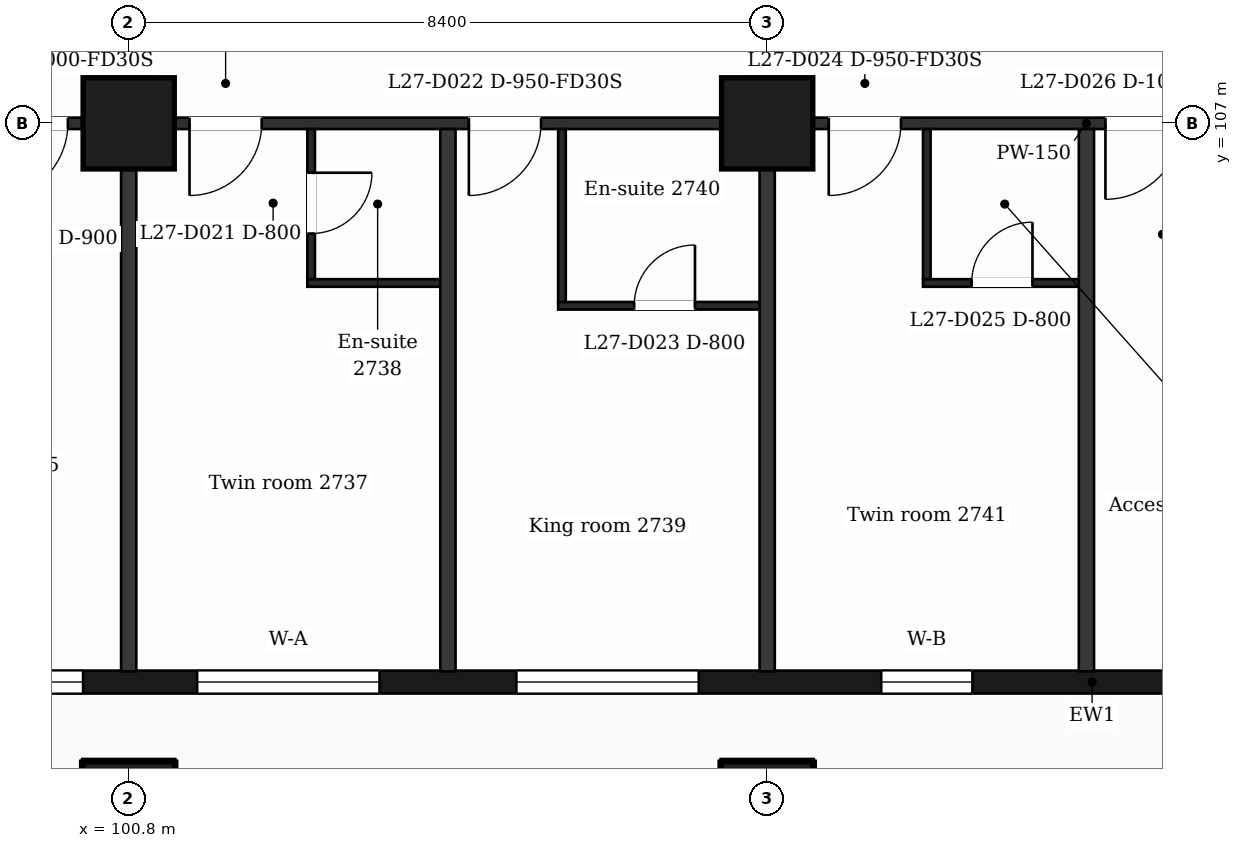
"""IFC4 building model, lengths in metres.
Left out: names, types, materials, properties, quantities, classifications, styles, units other than length and angle.
Written with IfcOpenShell. Run it as: python <this file> out.ifc"""

import sys

from ifc_helpers import new_model, si_unit, direction, frame, frame_2d, origin, origin_2d, place, context, subcontext, project, spatial, rectangle, extrude, element, fill, save


model = new_model("IFC4")
c1 = context("Model", 3, precision=1e-05, world=origin(), true_north=direction((0.0, 1.0)))
c2 = subcontext(c1, "Body", "Model", "MODEL_VIEW")
j1 = project(units=[si_unit("LENGTHUNIT", "METRE"), si_unit("PLANEANGLEUNIT", "RADIAN")], contexts=[c1])
p1 = place(None, origin())
s1 = spatial("IfcSite", under=j1, at=p1, CompositionType="ELEMENT")
p2 = place(p1, origin())
s2 = spatial("IfcBuilding", under=s1, at=p2, CompositionType="ELEMENT")
p3 = place(p2, frame((0.0, 0.0, 116.9)))
s3 = spatial("IfcBuildingStorey", under=s2, at=p3, CompositionType="ELEMENT", Elevation=116.9)
for number, where, z_axis, x_axis in (
    (1, (100.8, 98.0, 0.0), (0.0, 0.0, 1.0), (1.0, 0.0, 0.0)),
    (2, (109.2, 98.0, 0.0), (0.0, 0.0, 1.0), (1.0, 0.0, 0.0)),
    (3, (100.8, 107.0, 0.0), (0.0, 0.0, 1.0), (1.0, 0.0, 0.0)),
    (4, (109.2, 107.0, 0.0), (0.0, 0.0, 1.0), (1.0, 0.0, 0.0)),
):
    element("IfcColumn", number, at=place(p3, frame(where, z_axis=z_axis, x_axis=x_axis)), inside=s3, PredefinedType="COLUMN", context=c2, shape_type="SweptSolid", body=[
        extrude(rectangle(XDim=1.2, YDim=1.2, at=origin_2d()), origin(), (0.0, 0.0, 1.0), 3.7),
    ])
p4 = place(p3, frame((89.85, 99.65, 0.0), z_axis=(0.0, 0.0, 1.0), x_axis=(1.0, 0.0, 0.0)))
e5 = element("IfcWall", 5, at=p4, inside=s3, PredefinedType="SOLIDWALL", context=c2, shape_type="SweptSolid", body=[
    extrude(rectangle(XDim=47.25, YDim=0.3, at=frame_2d((23.625, 0.0))), origin(), (0.0, 0.0, 1.0), 3.38),
])
p5 = place(p4, frame((0.725, 0.0, 0.9)))
e6 = element("IfcOpeningElement", 6, at=p5, cuts=e5, PredefinedType="OPENING", context=c2, shape_type="SweptSolid", body=[
    extrude(rectangle(XDim=1.2, YDim=2.1, at=frame_2d((0.6, 1.05))), frame((0.0, 0.16, 0.0), z_axis=(0.0, -1.0, 0.0), x_axis=(1.0, 0.0, 0.0)), (0.0, 0.0, 1.0), 0.32),
])
p6 = place(p4, frame((3.45, 0.0, 0.9)))
e7 = element("IfcOpeningElement", 7, at=p6, cuts=e5, PredefinedType="OPENING", context=c2, shape_type="SweptSolid", body=[
    extrude(rectangle(XDim=2.4, YDim=2.1, at=frame_2d((1.2, 1.05))), frame((0.0, 0.16, 0.0), z_axis=(0.0, -1.0, 0.0), x_axis=(1.0, 0.0, 0.0)), (0.0, 0.0, 1.0), 0.32),
])
p7 = place(p4, frame((7.35, 0.0, 0.0)))
e8 = element("IfcOpeningElement", 8, at=p7, cuts=e5, PredefinedType="OPENING", context=c2, shape_type="SweptSolid", body=[
    extrude(rectangle(XDim=1.2, YDim=2.4, at=frame_2d((0.6, 1.2))), frame((0.0, 0.16, 0.0), z_axis=(0.0, -1.0, 0.0), x_axis=(1.0, 0.0, 0.0)), (0.0, 0.0, 1.0), 0.32),
])
p8 = place(p4, frame((9.15, 0.0, 0.9)))
e9 = element("IfcOpeningElement", 9, at=p8, cuts=e5, PredefinedType="OPENING", context=c2, shape_type="SweptSolid", body=[
    extrude(rectangle(XDim=1.2, YDim=2.1, at=frame_2d((0.6, 1.05))), frame((0.0, 0.16, 0.0), z_axis=(0.0, -1.0, 0.0), x_axis=(1.0, 0.0, 0.0)), (0.0, 0.0, 1.0), 0.32),
])
p9 = place(p4, frame((11.85, 0.0, 0.9)))
e10 = element("IfcOpeningElement", 10, at=p9, cuts=e5, PredefinedType="OPENING", context=c2, shape_type="SweptSolid", body=[
    extrude(rectangle(XDim=2.4, YDim=2.1, at=frame_2d((1.2, 1.05))), frame((0.0, 0.16, 0.0), z_axis=(0.0, -1.0, 0.0), x_axis=(1.0, 0.0, 0.0)), (0.0, 0.0, 1.0), 0.32),
])
p10 = place(p4, frame((16.05, 0.0, 0.9)))
e11 = element("IfcOpeningElement", 11, at=p10, cuts=e5, PredefinedType="OPENING", context=c2, shape_type="SweptSolid", body=[
    extrude(rectangle(XDim=2.4, YDim=2.1, at=frame_2d((1.2, 1.05))), frame((0.0, 0.16, 0.0), z_axis=(0.0, -1.0, 0.0), x_axis=(1.0, 0.0, 0.0)), (0.0, 0.0, 1.0), 0.32),
])
p11 = place(p4, frame((20.85, 0.0, 0.9)))
e12 = element("IfcOpeningElement", 12, at=p11, cuts=e5, PredefinedType="OPENING", context=c2, shape_type="SweptSolid", body=[
    extrude(rectangle(XDim=1.2, YDim=2.1, at=frame_2d((0.6, 1.05))), frame((0.0, 0.16, 0.0), z_axis=(0.0, -1.0, 0.0), x_axis=(1.0, 0.0, 0.0)), (0.0, 0.0, 1.0), 0.32),
])
p12 = place(p4, frame((25.05, 0.0, 0.9)))
e13 = element("IfcOpeningElement", 13, at=p12, cuts=e5, PredefinedType="OPENING", context=c2, shape_type="SweptSolid", body=[
    extrude(rectangle(XDim=1.2, YDim=2.1, at=frame_2d((0.6, 1.05))), frame((0.0, 0.16, 0.0), z_axis=(0.0, -1.0, 0.0), x_axis=(1.0, 0.0, 0.0)), (0.0, 0.0, 1.0), 0.32),
])
p13 = place(p4, frame((28.65, 0.0, 0.9)))
e14 = element("IfcOpeningElement", 14, at=p13, cuts=e5, PredefinedType="OPENING", context=c2, shape_type="SweptSolid", body=[
    extrude(rectangle(XDim=2.4, YDim=2.1, at=frame_2d((1.2, 1.05))), frame((0.0, 0.16, 0.0), z_axis=(0.0, -1.0, 0.0), x_axis=(1.0, 0.0, 0.0)), (0.0, 0.0, 1.0), 0.32),
])
p14 = place(p4, frame((32.85, 0.0, 0.9)))
e15 = element("IfcOpeningElement", 15, at=p14, cuts=e5, PredefinedType="OPENING", context=c2, shape_type="SweptSolid", body=[
    extrude(rectangle(XDim=2.4, YDim=2.1, at=frame_2d((1.2, 1.05))), frame((0.0, 0.16, 0.0), z_axis=(0.0, -1.0, 0.0), x_axis=(1.0, 0.0, 0.0)), (0.0, 0.0, 1.0), 0.32),
])
p15 = place(p4, frame((37.05, 0.0, 0.9)))
e16 = element("IfcOpeningElement", 16, at=p15, cuts=e5, PredefinedType="OPENING", context=c2, shape_type="SweptSolid", body=[
    extrude(rectangle(XDim=2.4, YDim=2.1, at=frame_2d((1.2, 1.05))), frame((0.0, 0.16, 0.0), z_axis=(0.0, -1.0, 0.0), x_axis=(1.0, 0.0, 0.0)), (0.0, 0.0, 1.0), 0.32),
])
p16 = place(p4, frame((41.25, 0.0, 0.9)))
e17 = element("IfcOpeningElement", 17, at=p16, cuts=e5, PredefinedType="OPENING", context=c2, shape_type="SweptSolid", body=[
    extrude(rectangle(XDim=2.4, YDim=2.1, at=frame_2d((1.2, 1.05))), frame((0.0, 0.16, 0.0), z_axis=(0.0, -1.0, 0.0), x_axis=(1.0, 0.0, 0.0)), (0.0, 0.0, 1.0), 0.32),
])
p17 = place(p4, frame((45.25, 0.0, 0.9)))
e18 = element("IfcOpeningElement", 18, at=p17, cuts=e5, PredefinedType="OPENING", context=c2, shape_type="SweptSolid", body=[
    extrude(rectangle(XDim=1.2, YDim=2.1, at=frame_2d((0.6, 1.05))), frame((0.0, 0.16, 0.0), z_axis=(0.0, -1.0, 0.0), x_axis=(1.0, 0.0, 0.0)), (0.0, 0.0, 1.0), 0.32),
])
p18 = place(p3, frame((106.45, 104.6, 0.0), z_axis=(0.0, 0.0, 1.0), x_axis=(1.0, 0.0, 0.0)))
e19 = element("IfcWall", 19, at=p18, inside=s3, PredefinedType="PARTITIONING", context=c2, shape_type="SweptSolid", body=[
    extrude(rectangle(XDim=2.75, YDim=0.1, at=frame_2d((1.375, 0.0))), origin(), (0.0, 0.0, 1.0), 3.38),
])
p19 = place(p18, frame((1.0, 0.0, 0.0)))
e20 = element("IfcOpeningElement", 20, at=p19, cuts=e19, PredefinedType="OPENING", context=c2, shape_type="SweptSolid", body=[
    extrude(rectangle(XDim=0.8, YDim=2.1, at=frame_2d((0.4, 1.05))), frame((0.0, 0.06, 0.0), z_axis=(0.0, -1.0, 0.0), x_axis=(1.0, 0.0, 0.0)), (0.0, 0.0, 1.0), 0.12),
])
p20 = place(p3, frame((103.15, 104.9, 0.0), z_axis=(0.0, 0.0, 1.0), x_axis=(1.0, 0.0, 0.0)))
e21 = element("IfcWall", 21, at=p20, inside=s3, PredefinedType="PARTITIONING", context=c2, shape_type="SweptSolid", body=[
    extrude(rectangle(XDim=1.85, YDim=0.1, at=frame_2d((0.925, 0.0))), origin(), (0.0, 0.0, 1.0), 3.38),
])
p21 = place(p3, frame((111.25, 104.9, 0.0), z_axis=(0.0, 0.0, 1.0), x_axis=(1.0, 0.0, 0.0)))
e22 = element("IfcWall", 22, at=p21, inside=s3, PredefinedType="PARTITIONING", context=c2, shape_type="SweptSolid", body=[
    extrude(rectangle(XDim=2.15, YDim=0.1, at=frame_2d((1.075, 0.0))), origin(), (0.0, 0.0, 1.0), 3.38),
])
p22 = place(p21, frame((0.64, 0.0, 0.0)))
e23 = element("IfcOpeningElement", 23, at=p22, cuts=e22, PredefinedType="OPENING", context=c2, shape_type="SweptSolid", body=[
    extrude(rectangle(XDim=0.8, YDim=2.1, at=frame_2d((0.4, 1.05))), frame((0.0, 0.06, 0.0), z_axis=(0.0, -1.0, 0.0), x_axis=(1.0, 0.0, 0.0)), (0.0, 0.0, 1.0), 0.12),
])
p23 = place(p3, frame((87.018, 107.0, 0.0), z_axis=(0.0, 0.0, 1.0), x_axis=(1.0, 0.0, 0.0)))
e24 = element("IfcWall", 24, at=p23, inside=s3, PredefinedType="PARTITIONING", context=c2, shape_type="SweptSolid", body=[
    extrude(rectangle(XDim=52.765, YDim=0.15, at=frame_2d((26.382, 0.0))), origin(), (0.0, 0.0, 1.0), 3.38),
])
p24 = place(p23, frame((1.276, 0.0, 0.0)))
e25 = element("IfcOpeningElement", 25, at=p24, cuts=e24, PredefinedType="OPENING", context=c2, shape_type="SweptSolid", body=[
    extrude(rectangle(XDim=0.95, YDim=2.1, at=frame_2d((0.475, 1.05))), frame((0.0, 0.085, 0.0), z_axis=(0.0, -1.0, 0.0), x_axis=(1.0, 0.0, 0.0)), (0.0, 0.0, 1.0), 0.17),
])
p25 = place(p23, frame((6.192, 0.0, 0.0)))
e26 = element("IfcOpeningElement", 26, at=p25, cuts=e24, PredefinedType="OPENING", context=c2, shape_type="SweptSolid", body=[
    extrude(rectangle(XDim=0.95, YDim=2.1, at=frame_2d((0.475, 1.05))), frame((0.0, 0.085, 0.0), z_axis=(0.0, -1.0, 0.0), x_axis=(1.0, 0.0, 0.0)), (0.0, 0.0, 1.0), 0.17),
])
p26 = place(p23, frame((11.982, 0.0, 0.0)))
e27 = element("IfcOpeningElement", 27, at=p26, cuts=e24, PredefinedType="OPENING", context=c2, shape_type="SweptSolid", body=[
    extrude(rectangle(XDim=1.0, YDim=2.1, at=frame_2d((0.5, 1.05))), frame((0.0, 0.085, 0.0), z_axis=(0.0, -1.0, 0.0), x_axis=(1.0, 0.0, 0.0)), (0.0, 0.0, 1.0), 0.17),
])
p27 = place(p23, frame((14.582, 0.0, 0.0)))
e28 = element("IfcOpeningElement", 28, at=p27, cuts=e24, PredefinedType="OPENING", context=c2, shape_type="SweptSolid", body=[
    extrude(rectangle(XDim=0.95, YDim=2.1, at=frame_2d((0.475, 1.05))), frame((0.0, 0.085, 0.0), z_axis=(0.0, -1.0, 0.0), x_axis=(1.0, 0.0, 0.0)), (0.0, 0.0, 1.0), 0.17),
])
p28 = place(p23, frame((18.257, 0.0, 0.0)))
e29 = element("IfcOpeningElement", 29, at=p28, cuts=e24, PredefinedType="OPENING", context=c2, shape_type="SweptSolid", body=[
    extrude(rectangle(XDim=0.95, YDim=2.1, at=frame_2d((0.475, 1.05))), frame((0.0, 0.085, 0.0), z_axis=(0.0, -1.0, 0.0), x_axis=(1.0, 0.0, 0.0)), (0.0, 0.0, 1.0), 0.17),
])
p29 = place(p23, frame((22.992, 0.0, 0.0)))
e30 = element("IfcOpeningElement", 30, at=p29, cuts=e24, PredefinedType="OPENING", context=c2, shape_type="SweptSolid", body=[
    extrude(rectangle(XDim=0.95, YDim=2.1, at=frame_2d((0.475, 1.05))), frame((0.0, 0.085, 0.0), z_axis=(0.0, -1.0, 0.0), x_axis=(1.0, 0.0, 0.0)), (0.0, 0.0, 1.0), 0.17),
])
p30 = place(p23, frame((26.632, 0.0, 0.0)))
e31 = element("IfcOpeningElement", 31, at=p30, cuts=e24, PredefinedType="OPENING", context=c2, shape_type="SweptSolid", body=[
    extrude(rectangle(XDim=1.0, YDim=2.1, at=frame_2d((0.5, 1.05))), frame((0.0, 0.085, 0.0), z_axis=(0.0, -1.0, 0.0), x_axis=(1.0, 0.0, 0.0)), (0.0, 0.0, 1.0), 0.17),
])
p31 = place(p23, frame((33.557, 0.0, 0.0)))
e32 = element("IfcOpeningElement", 32, at=p31, cuts=e24, PredefinedType="OPENING", context=c2, shape_type="SweptSolid", body=[
    extrude(rectangle(XDim=0.95, YDim=2.1, at=frame_2d((0.475, 1.05))), frame((0.0, 0.085, 0.0), z_axis=(0.0, -1.0, 0.0), x_axis=(1.0, 0.0, 0.0)), (0.0, 0.0, 1.0), 0.17),
])
p32 = place(p23, frame((37.182, 0.0, 0.0)))
e33 = element("IfcOpeningElement", 33, at=p32, cuts=e24, PredefinedType="OPENING", context=c2, shape_type="SweptSolid", body=[
    extrude(rectangle(XDim=0.95, YDim=2.1, at=frame_2d((0.475, 1.05))), frame((0.0, 0.085, 0.0), z_axis=(0.0, -1.0, 0.0), x_axis=(1.0, 0.0, 0.0)), (0.0, 0.0, 1.0), 0.17),
])
p33 = place(p23, frame((41.957, 0.0, 0.0)))
e34 = element("IfcOpeningElement", 34, at=p33, cuts=e24, PredefinedType="OPENING", context=c2, shape_type="SweptSolid", body=[
    extrude(rectangle(XDim=0.95, YDim=2.1, at=frame_2d((0.475, 1.05))), frame((0.0, 0.085, 0.0), z_axis=(0.0, -1.0, 0.0), x_axis=(1.0, 0.0, 0.0)), (0.0, 0.0, 1.0), 0.17),
])
p34 = place(p23, frame((45.622, 0.0, 0.0)))
e35 = element("IfcOpeningElement", 35, at=p34, cuts=e24, PredefinedType="OPENING", context=c2, shape_type="SweptSolid", body=[
    extrude(rectangle(XDim=0.95, YDim=2.1, at=frame_2d((0.475, 1.05))), frame((0.0, 0.085, 0.0), z_axis=(0.0, -1.0, 0.0), x_axis=(1.0, 0.0, 0.0)), (0.0, 0.0, 1.0), 0.17),
])
p35 = place(p23, frame((48.56, 0.0, 0.0)))
e36 = element("IfcOpeningElement", 36, at=p35, cuts=e24, PredefinedType="OPENING", context=c2, shape_type="SweptSolid", body=[
    extrude(rectangle(XDim=0.95, YDim=2.1, at=frame_2d((0.475, 1.05))), frame((0.0, 0.085, 0.0), z_axis=(0.0, -1.0, 0.0), x_axis=(1.0, 0.0, 0.0)), (0.0, 0.0, 1.0), 0.17),
])
p36 = place(p3, frame((100.8, 99.79, 0.0), z_axis=(0.0, 0.0, 1.0), x_axis=(0.0, 1.0, 0.0)))
e37 = element("IfcWall", 37, at=p36, inside=s3, PredefinedType="PARTITIONING", context=c2, shape_type="SweptSolid", body=[
    extrude(rectangle(XDim=7.135, YDim=0.2, at=frame_2d((3.567, 0.0))), origin(), (0.0, 0.0, 1.0), 3.38),
])
p37 = place(p3, frame((103.2, 104.95, 0.0), z_axis=(0.0, 0.0, 1.0), x_axis=(0.0, 1.0, 0.0)))
e38 = element("IfcWall", 38, at=p37, inside=s3, PredefinedType="PARTITIONING", context=c2, shape_type="SweptSolid", body=[
    extrude(rectangle(XDim=1.975, YDim=0.1, at=frame_2d((0.988, 0.0))), origin(), (0.0, 0.0, 1.0), 3.38),
])
p38 = place(p37, frame((0.6, 0.0, 0.0)))
e39 = element("IfcOpeningElement", 39, at=p38, cuts=e38, PredefinedType="OPENING", context=c2, shape_type="SweptSolid", body=[
    extrude(rectangle(XDim=0.8, YDim=2.1, at=frame_2d((0.4, 1.05))), frame((0.0, 0.06, 0.0), z_axis=(0.0, -1.0, 0.0), x_axis=(1.0, 0.0, 0.0)), (0.0, 0.0, 1.0), 0.12),
])
p39 = place(p3, frame((105.0, 99.79, 0.0), z_axis=(0.0, 0.0, 1.0), x_axis=(0.0, 1.0, 0.0)))
e40 = element("IfcWall", 40, at=p39, inside=s3, PredefinedType="PARTITIONING", context=c2, shape_type="SweptSolid", body=[
    extrude(rectangle(XDim=7.135, YDim=0.2, at=frame_2d((3.567, 0.0))), origin(), (0.0, 0.0, 1.0), 3.38),
])
p40 = place(p3, frame((106.5, 104.65, 0.0), z_axis=(0.0, 0.0, 1.0), x_axis=(0.0, 1.0, 0.0)))
e41 = element("IfcWall", 41, at=p40, inside=s3, PredefinedType="PARTITIONING", context=c2, shape_type="SweptSolid", body=[
    extrude(rectangle(XDim=2.275, YDim=0.1, at=frame_2d((1.138, 0.0))), origin(), (0.0, 0.0, 1.0), 3.38),
])
p41 = place(p3, frame((109.2, 99.79, 0.0), z_axis=(0.0, 0.0, 1.0), x_axis=(0.0, 1.0, 0.0)))
e42 = element("IfcWall", 42, at=p41, inside=s3, PredefinedType="PARTITIONING", context=c2, shape_type="SweptSolid", body=[
    extrude(rectangle(XDim=7.135, YDim=0.2, at=frame_2d((3.567, 0.0))), origin(), (0.0, 0.0, 1.0), 3.38),
])
p42 = place(p3, frame((111.3, 104.95, 0.0), z_axis=(0.0, 0.0, 1.0), x_axis=(0.0, 1.0, 0.0)))
e43 = element("IfcWall", 43, at=p42, inside=s3, PredefinedType="PARTITIONING", context=c2, shape_type="SweptSolid", body=[
    extrude(rectangle(XDim=1.975, YDim=0.1, at=frame_2d((0.988, 0.0))), origin(), (0.0, 0.0, 1.0), 3.38),
])
p43 = place(p3, frame((113.4, 99.79, 0.0), z_axis=(0.0, 0.0, 1.0), x_axis=(0.0, 1.0, 0.0)))
e44 = element("IfcWall", 44, at=p43, inside=s3, PredefinedType="PARTITIONING", context=c2, shape_type="SweptSolid", body=[
    extrude(rectangle(XDim=7.135, YDim=0.2, at=frame_2d((3.567, 0.0))), origin(), (0.0, 0.0, 1.0), 3.38),
])
p44 = place(p8, origin())
e45 = element("IfcWindow", 45, at=p44, inside=s3, PartitioningType="SINGLE_PANEL", PredefinedType="WINDOW", context=c2, shape_type="SweptSolid", body=[
    extrude(rectangle(XDim=1.2, YDim=2.1, at=frame_2d((0.6, 1.05))), frame((0.0, 0.03, 0.0), z_axis=(0.0, -1.0, 0.0), x_axis=(1.0, 0.0, 0.0)), (0.0, 0.0, 1.0), 0.06),
])
fill(e9, e45)
p45 = place(p9, origin())
e46 = element("IfcWindow", 46, at=p45, inside=s3, PartitioningType="SINGLE_PANEL", PredefinedType="WINDOW", context=c2, shape_type="SweptSolid", body=[
    extrude(rectangle(XDim=2.4, YDim=2.1, at=frame_2d((1.2, 1.05))), frame((0.0, 0.03, 0.0), z_axis=(0.0, -1.0, 0.0), x_axis=(1.0, 0.0, 0.0)), (0.0, 0.0, 1.0), 0.06),
])
fill(e10, e46)
p46 = place(p10, origin())
e47 = element("IfcWindow", 47, at=p46, inside=s3, PartitioningType="SINGLE_PANEL", PredefinedType="WINDOW", context=c2, shape_type="SweptSolid", body=[
    extrude(rectangle(XDim=2.4, YDim=2.1, at=frame_2d((1.2, 1.05))), frame((0.0, 0.03, 0.0), z_axis=(0.0, -1.0, 0.0), x_axis=(1.0, 0.0, 0.0)), (0.0, 0.0, 1.0), 0.06),
])
fill(e11, e47)
p47 = place(p11, origin())
e48 = element("IfcWindow", 48, at=p47, inside=s3, PartitioningType="SINGLE_PANEL", PredefinedType="WINDOW", context=c2, shape_type="SweptSolid", body=[
    extrude(rectangle(XDim=1.2, YDim=2.1, at=frame_2d((0.6, 1.05))), frame((0.0, 0.03, 0.0), z_axis=(0.0, -1.0, 0.0), x_axis=(1.0, 0.0, 0.0)), (0.0, 0.0, 1.0), 0.06),
])
fill(e12, e48)
p48 = place(p26, origin())
e49 = element("IfcDoor", 49, at=p48, inside=s3, OperationType="SINGLE_SWING_LEFT", PredefinedType="DOOR", context=c2, shape_type="SweptSolid", body=[
    extrude(rectangle(XDim=1.0, YDim=2.1, at=frame_2d((0.5, 1.05))), frame((0.0, 0.025, 0.0), z_axis=(0.0, -1.0, 0.0), x_axis=(1.0, 0.0, 0.0)), (0.0, 0.0, 1.0), 0.05),
])
fill(e27, e49)
p49 = place(p27, origin())
e50 = element("IfcDoor", 50, at=p49, inside=s3, OperationType="SINGLE_SWING_LEFT", PredefinedType="DOOR", context=c2, shape_type="SweptSolid", body=[
    extrude(rectangle(XDim=0.95, YDim=2.1, at=frame_2d((0.475, 1.05))), frame((0.0, 0.025, 0.0), z_axis=(0.0, -1.0, 0.0), x_axis=(1.0, 0.0, 0.0)), (0.0, 0.0, 1.0), 0.05),
])
fill(e28, e50)
p50 = place(p38, origin())
e51 = element("IfcDoor", 51, at=p50, inside=s3, OperationType="SINGLE_SWING_RIGHT", PredefinedType="DOOR", context=c2, shape_type="SweptSolid", body=[
    extrude(rectangle(XDim=0.8, YDim=2.1, at=frame_2d((0.4, 1.05))), frame((0.0, 0.025, 0.0), z_axis=(0.0, -1.0, 0.0), x_axis=(1.0, 0.0, 0.0)), (0.0, 0.0, 1.0), 0.05),
])
fill(e39, e51)
p51 = place(p28, origin())
e52 = element("IfcDoor", 52, at=p51, inside=s3, OperationType="SINGLE_SWING_LEFT", PredefinedType="DOOR", context=c2, shape_type="SweptSolid", body=[
    extrude(rectangle(XDim=0.95, YDim=2.1, at=frame_2d((0.475, 1.05))), frame((0.0, 0.025, 0.0), z_axis=(0.0, -1.0, 0.0), x_axis=(1.0, 0.0, 0.0)), (0.0, 0.0, 1.0), 0.05),
])
fill(e29, e52)
p52 = place(p19, origin())
e53 = element("IfcDoor", 53, at=p52, inside=s3, OperationType="SINGLE_SWING_RIGHT", PredefinedType="DOOR", context=c2, shape_type="SweptSolid", body=[
    extrude(rectangle(XDim=0.8, YDim=2.1, at=frame_2d((0.4, 1.05))), frame((0.0, 0.025, 0.0), z_axis=(0.0, -1.0, 0.0), x_axis=(1.0, 0.0, 0.0)), (0.0, 0.0, 1.0), 0.05),
])
fill(e20, e53)
p53 = place(p29, origin())
e54 = element("IfcDoor", 54, at=p53, inside=s3, OperationType="SINGLE_SWING_LEFT", PredefinedType="DOOR", context=c2, shape_type="SweptSolid", body=[
    extrude(rectangle(XDim=0.95, YDim=2.1, at=frame_2d((0.475, 1.05))), frame((0.0, 0.025, 0.0), z_axis=(0.0, -1.0, 0.0), x_axis=(1.0, 0.0, 0.0)), (0.0, 0.0, 1.0), 0.05),
])
fill(e30, e54)
p54 = place(p22, origin())
e55 = element("IfcDoor", 55, at=p54, inside=s3, OperationType="SINGLE_SWING_RIGHT", PredefinedType="DOOR", context=c2, shape_type="SweptSolid", body=[
    extrude(rectangle(XDim=0.8, YDim=2.1, at=frame_2d((0.4, 1.05))), frame((0.0, 0.025, 0.0), z_axis=(0.0, -1.0, 0.0), x_axis=(1.0, 0.0, 0.0)), (0.0, 0.0, 1.0), 0.05),
])
fill(e23, e55)
p55 = place(p30, origin())
e56 = element("IfcDoor", 56, at=p55, inside=s3, OperationType="SINGLE_SWING_LEFT", PredefinedType="DOOR", context=c2, shape_type="SweptSolid", body=[
    extrude(rectangle(XDim=1.0, YDim=2.1, at=frame_2d((0.5, 1.05))), frame((0.0, 0.025, 0.0), z_axis=(0.0, -1.0, 0.0), x_axis=(1.0, 0.0, 0.0)), (0.0, 0.0, 1.0), 0.05),
])
fill(e31, e56)
save(model, sys.argv[1])
